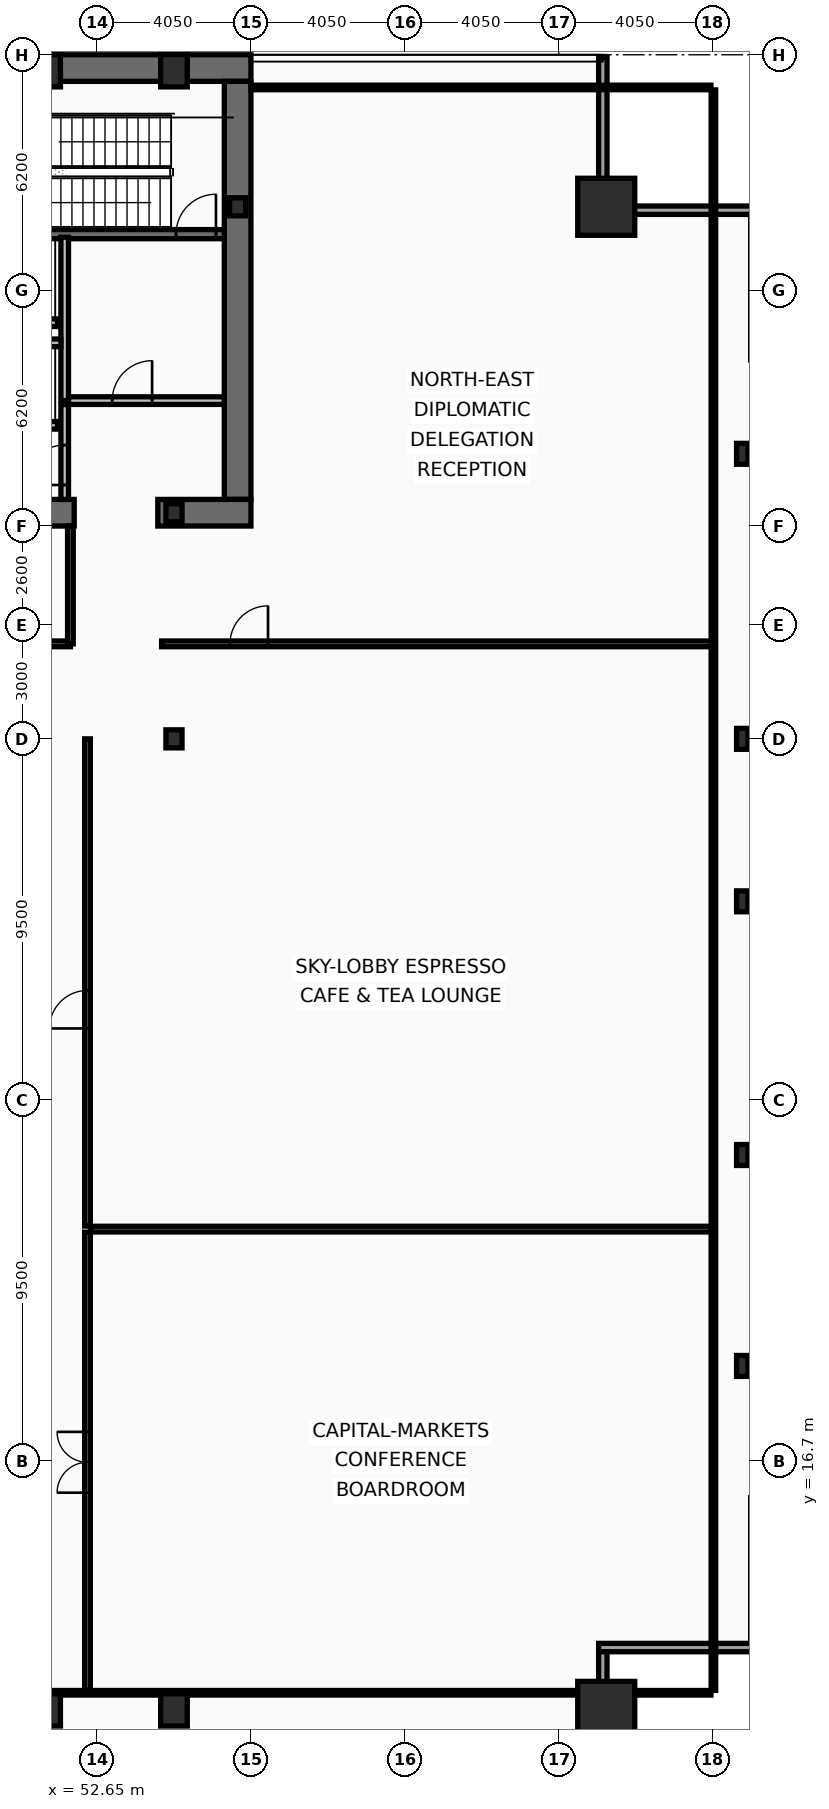
"""IFC4 building model, lengths in metres.
Left out: names, types, materials, properties, quantities, classifications, styles, units other than length and angle.
Written with IfcOpenShell. Run it as: python <this file> out.ifc"""

import sys

from ifc_helpers import new_model, si_unit, direction, frame, frame_2d, origin, origin_2d, place, context, subcontext, project, spatial, rectangle, hollow_rectangle, i_section, extrude, element, fill, save


model = new_model("IFC4")
c1 = context("Model", 3, precision=1e-05, world=origin(), true_north=direction((0.0, 1.0)))
c2 = subcontext(c1, "Body", "Model", "MODEL_VIEW")
j1 = project(units=[si_unit("LENGTHUNIT", "METRE"), si_unit("PLANEANGLEUNIT", "RADIAN")], contexts=[c1])
p1 = place(None, origin())
s1 = spatial("IfcSite", under=j1, at=p1, CompositionType="ELEMENT")
p2 = place(p1, origin())
s2 = spatial("IfcBuilding", under=s1, at=p2, CompositionType="ELEMENT")
p3 = place(p2, frame((0.0, 0.0, 106.6)))
s3 = spatial("IfcBuildingStorey", under=s2, at=p3, CompositionType="ELEMENT", Elevation=106.6)
p4 = place(p3, frame((16.2, 53.35, 0.0), z_axis=(0.0, 0.0, 1.0), x_axis=(1.0, 0.0, 0.0)))
e1 = element("IfcWall", 1, at=p4, inside=s3, PredefinedType="SHEAR", context=c2, shape_type="SweptSolid", body=[
    extrude(rectangle(XDim=40.5, YDim=0.7, at=frame_2d((20.25, 0.0))), origin(), (0.0, 0.0, 1.0), 4.24),
])
p5 = place(p3, frame((56.35, 53.0, 0.0), z_axis=(0.0, 0.0, 1.0), x_axis=(0.0, -1.0, 0.0)))
e2 = element("IfcWall", 2, at=p5, inside=s3, PredefinedType="SHEAR", context=c2, shape_type="SweptSolid", body=[
    extrude(rectangle(XDim=11.0, YDim=0.7, at=frame_2d((5.5, 0.0))), origin(), (0.0, 0.0, 1.0), 4.24),
])
p6 = place(p3, frame((52.05, 41.65, 0.0), z_axis=(0.0, 0.0, 1.0), x_axis=(-1.0, 0.0, 0.0)))
e3 = element("IfcWall", 3, at=p6, inside=s3, PredefinedType="SHEAR", context=c2, shape_type="SweptSolid", body=[
    extrude(rectangle(XDim=11.3, YDim=0.7, at=frame_2d((5.65, 0.0))), origin(), (0.0, 0.0, 1.0), 4.24),
])
p7 = place(p3, frame((56.7, 41.65, 0.0), z_axis=(0.0, 0.0, 1.0), x_axis=(-1.0, 0.0, 0.0)))
e4 = element("IfcWall", 4, at=p7, inside=s3, PredefinedType="SHEAR", context=c2, shape_type="SweptSolid", body=[
    extrude(rectangle(XDim=2.45, YDim=0.7, at=frame_2d((1.225, 0.0))), origin(), (0.0, 0.0, 1.0), 4.24),
])
p8 = place(p3, frame((48.63, 48.98, 0.0), z_axis=(0.0, 0.0, 1.0), x_axis=(1.0, 0.0, 0.0)))
e5 = element("IfcWall", 5, at=p8, inside=s3, PredefinedType="SHEAR", context=c2, shape_type="SweptSolid", body=[
    extrude(rectangle(XDim=7.37, YDim=0.24, at=frame_2d((3.685, 0.0))), origin(), (0.0, 0.0, 1.0), 4.24),
])
p9 = place(p8, frame((6.1, 0.0, 0.0)))
e6 = element("IfcOpeningElement", 6, at=p9, cuts=e5, PredefinedType="OPENING", context=c2, shape_type="SweptSolid", body=[
    extrude(rectangle(XDim=1.05, YDim=2.15, at=frame_2d((0.525, 1.075))), frame((0.0, 0.13, 0.0), z_axis=(0.0, -1.0, 0.0), x_axis=(1.0, 0.0, 0.0)), (0.0, 0.0, 1.0), 0.26),
])
for number, where, z_axis, x_axis in (
    (7, (66.05, 10.15, 0.0), (0.0, 0.0, 1.0), (1.0, 0.0, 0.0)),
    (8, (66.05, 49.7, 0.0), (0.0, 0.0, 1.0), (1.0, 0.0, 0.0)),
):
    element("IfcColumn", number, at=place(p3, frame(where, z_axis=z_axis, x_axis=x_axis)), inside=s3, PredefinedType="COLUMN", context=c2, shape_type="SweptSolid", body=[
        extrude(hollow_rectangle(XDim=1.5, YDim=1.5, WallThickness=0.07, at=origin_2d()), origin(), (0.0, 0.0, 1.0), 4.4),
    ])
for number, where, z_axis, x_axis in (
    (9, (51.337, 10.15, 0.0), (0.0, 0.0, 1.0), (1.0, 0.0, 0.0)),
    (10, (54.675, 10.15, 0.0), (0.0, 0.0, 1.0), (1.0, 0.0, 0.0)),
    (11, (51.337, 53.28, 0.0), (0.0, 0.0, 1.0), (1.0, 0.0, 0.0)),
    (12, (54.675, 53.28, 0.0), (0.0, 0.0, 1.0), (1.0, 0.0, 0.0)),
):
    element("IfcColumn", number, at=place(p3, frame(where, z_axis=z_axis, x_axis=x_axis)), inside=s3, PredefinedType="COLUMN", context=c2, shape_type="SweptSolid", body=[
        extrude(hollow_rectangle(XDim=0.7, YDim=0.85, WallThickness=0.05, at=origin_2d()), origin(), (0.0, 0.0, 1.0), 4.4),
    ])
for number, where, z_axis, x_axis in (
    (13, (69.63, 19.2, 0.0), (0.0, 0.0, 1.0), (1.0, 0.0, 0.0)),
    (14, (69.63, 24.75, 0.0), (0.0, 0.0, 1.0), (1.0, 0.0, 0.0)),
    (15, (69.63, 31.425, 0.0), (0.0, 0.0, 1.0), (1.0, 0.0, 0.0)),
    (16, (69.63, 35.7, 0.0), (0.0, 0.0, 1.0), (1.0, 0.0, 0.0)),
    (17, (69.63, 43.2, 0.0), (0.0, 0.0, 1.0), (1.0, 0.0, 0.0)),
):
    element("IfcColumn", number, at=place(p3, frame(where, z_axis=z_axis, x_axis=x_axis)), inside=s3, PredefinedType="COLUMN", context=c2, shape_type="SweptSolid", body=[
        extrude(i_section(OverallWidth=0.3, OverallDepth=0.55, WebThickness=0.015, FlangeThickness=0.029, at=origin_2d()), origin(), (0.0, 0.0, 1.0), 4.4),
    ])
for number, where, z_axis, x_axis in (
    (18, (56.35, 49.7, 0.0), (0.0, 0.0, 1.0), (1.0, 0.0, 0.0)),
    (19, (54.675, 35.7, 0.0), (0.0, 0.0, 1.0), (1.0, 0.0, 0.0)),
    (20, (54.675, 41.65, 0.0), (0.0, 0.0, 1.0), (1.0, 0.0, 0.0)),
):
    element("IfcColumn", number, at=place(p3, frame(where, z_axis=z_axis, x_axis=x_axis)), inside=s3, PredefinedType="COLUMN", context=c2, shape_type="SweptSolid", body=[
        extrude(i_section(OverallWidth=0.424, OverallDepth=0.474, WebThickness=0.048, FlangeThickness=0.077, at=origin_2d()), origin(), (0.0, 0.0, 1.0), 4.4),
    ])
p10 = place(p3, frame((65.96, 53.63, 0.0), z_axis=(0.0, 0.0, 1.0), x_axis=(0.0, -1.0, 0.0)))
e21 = element("IfcWall", 21, at=p10, inside=s3, PredefinedType="SOLIDWALL", context=c2, shape_type="SweptSolid", body=[
    extrude(rectangle(XDim=3.91, YDim=0.22, at=frame_2d((1.955, 0.0))), origin(), (0.0, 0.0, 1.0), 3.63),
])
for number, where, z_axis, x_axis in (
    (22, (65.85, 49.61, 0.0), (0.0, 0.0, 1.0), (1.0, 0.0, 0.0)),
    (23, (70.07, 11.79, 0.0), (0.0, 0.0, 1.0), (-1.0, 0.0, 0.0)),
):
    element("IfcWall", number, at=place(p3, frame(where, z_axis=z_axis, x_axis=x_axis)), inside=s3, PredefinedType="SOLIDWALL", context=c2, shape_type="SweptSolid", body=[
        extrude(rectangle(XDim=4.22, YDim=0.22, at=frame_2d((2.11, 0.0))), origin(), (0.0, 0.0, 1.0), 3.63),
    ])
p11 = place(p3, frame((65.96, 11.68, 0.0), z_axis=(0.0, 0.0, 1.0), x_axis=(0.0, -1.0, 0.0)))
e24 = element("IfcWall", 24, at=p11, inside=s3, PredefinedType="SOLIDWALL", context=c2, shape_type="SweptSolid", body=[
    extrude(rectangle(XDim=3.91, YDim=0.22, at=frame_2d((1.955, 0.0))), origin(), (0.0, 0.0, 1.0), 3.63),
])
p12 = place(p3, frame((51.61, 43.95, 0.0), z_axis=(0.0, 0.0, 1.0), x_axis=(-1.0, 0.0, 0.0)))
e25 = element("IfcWall", 25, at=p12, inside=s3, PredefinedType="PARTITIONING", context=c2, shape_type="SweptSolid", body=[
    extrude(rectangle(XDim=2.92, YDim=0.2, at=frame_2d((1.46, 0.0))), origin(), (0.0, 0.0, 1.0), 4.24),
])
p13 = place(p12, frame((0.81, 0.0, 0.0)))
e26 = element("IfcOpeningElement", 26, at=p13, cuts=e25, PredefinedType="OPENING", context=c2, shape_type="SweptSolid", body=[
    extrude(rectangle(XDim=1.3, YDim=2.18, at=frame_2d((0.65, 1.09))), frame((0.0, 0.11, 0.0), z_axis=(0.0, -1.0, 0.0), x_axis=(1.0, 0.0, 0.0)), (0.0, 0.0, 1.0), 0.22),
])
p14 = place(p3, frame((51.61, 46.65, 0.0), z_axis=(0.0, 0.0, 1.0), x_axis=(-1.0, 0.0, 0.0)))
e27 = element("IfcWall", 27, at=p14, inside=s3, PredefinedType="PARTITIONING", context=c2, shape_type="SweptSolid", body=[
    extrude(rectangle(XDim=2.92, YDim=0.2, at=frame_2d((1.46, 0.0))), origin(), (0.0, 0.0, 1.0), 4.24),
])
p15 = place(p14, frame((0.86, 0.0, 0.0)))
e28 = element("IfcOpeningElement", 28, at=p15, cuts=e27, PredefinedType="OPENING", context=c2, shape_type="SweptSolid", body=[
    extrude(rectangle(XDim=1.2, YDim=2.18, at=frame_2d((0.6, 1.09))), frame((0.0, 0.11, 0.0), z_axis=(0.0, -1.0, 0.0), x_axis=(1.0, 0.0, 0.0)), (0.0, 0.0, 1.0), 0.22),
])
p16 = place(p3, frame((51.8, 44.6, 0.0), z_axis=(0.0, 0.0, 1.0), x_axis=(0.0, 1.0, 0.0)))
e29 = element("IfcWall", 29, at=p16, inside=s3, PredefinedType="PARTITIONING", context=c2, shape_type="SweptSolid", body=[
    extrude(rectangle(XDim=4.3, YDim=0.2, at=frame_2d((2.15, 0.0))), origin(), (0.0, 0.0, 1.0), 4.24),
])
p17 = place(p3, frame((51.9, 44.6, 0.0), z_axis=(0.0, 0.0, 1.0), x_axis=(1.0, 0.0, 0.0)))
e30 = element("IfcWall", 30, at=p17, inside=s3, PredefinedType="PARTITIONING", context=c2, shape_type="SweptSolid", body=[
    extrude(rectangle(XDim=4.1, YDim=0.2, at=frame_2d((2.05, 0.0))), origin(), (0.0, 0.0, 1.0), 4.24),
])
p18 = place(p17, frame((1.15, 0.0, 0.0)))
e31 = element("IfcOpeningElement", 31, at=p18, cuts=e30, PredefinedType="OPENING", context=c2, shape_type="SweptSolid", body=[
    extrude(rectangle(XDim=1.05, YDim=2.15, at=frame_2d((0.525, 1.075))), frame((0.0, 0.11, 0.0), z_axis=(0.0, -1.0, 0.0), x_axis=(1.0, 0.0, 0.0)), (0.0, 0.0, 1.0), 0.22),
])
p19 = place(p3, frame((48.63, 46.12, 0.0), z_axis=(0.0, 0.0, 1.0), x_axis=(1.0, 0.0, 0.0)))
e32 = element("IfcWall", 32, at=p19, inside=s3, PredefinedType="PARTITIONING", context=c2, shape_type="SweptSolid", body=[
    extrude(rectangle(XDim=3.07, YDim=0.2, at=frame_2d((1.535, 0.0))), origin(), (0.0, 0.0, 1.0), 4.24),
])
p20 = place(p3, frame((51.8, 42.0, 0.0), z_axis=(0.0, 0.0, 1.0), x_axis=(0.0, 1.0, 0.0)))
e33 = element("IfcWall", 33, at=p20, inside=s3, PredefinedType="PARTITIONING", context=c2, shape_type="SweptSolid", body=[
    extrude(rectangle(XDim=2.495, YDim=0.2, at=frame_2d((1.248, 0.0))), origin(), (0.0, 0.0, 1.0), 4.24),
])
p21 = place(p20, frame((0.38, 0.0, 0.0)))
e34 = element("IfcOpeningElement", 34, at=p21, cuts=e33, PredefinedType="OPENING", context=c2, shape_type="SweptSolid", body=[
    extrude(rectangle(XDim=1.05, YDim=2.15, at=frame_2d((0.525, 1.075))), frame((0.0, 0.11, 0.0), z_axis=(0.0, -1.0, 0.0), x_axis=(1.0, 0.0, 0.0)), (0.0, 0.0, 1.0), 0.22),
])
p22 = place(p3, frame((52.4, 10.665, 0.0), z_axis=(0.0, 0.0, 1.0), x_axis=(0.0, 1.0, 0.0)))
e35 = element("IfcWall", 35, at=p22, inside=s3, PredefinedType="PARTITIONING", context=c2, shape_type="SweptSolid", body=[
    extrude(rectangle(XDim=12.055, YDim=0.15, at=frame_2d((6.027, 0.0))), origin(), (0.0, 0.0, 1.0), 3.68),
])
p23 = place(p22, frame((5.2, 0.0, 0.0)))
e36 = element("IfcOpeningElement", 36, at=p23, cuts=e35, PredefinedType="OPENING", context=c2, shape_type="SweptSolid", body=[
    extrude(rectangle(XDim=1.6, YDim=2.15, at=frame_2d((0.8, 1.075))), frame((0.0, 0.085, 0.0), z_axis=(0.0, -1.0, 0.0), x_axis=(1.0, 0.0, 0.0)), (0.0, 0.0, 1.0), 0.17),
])
p24 = place(p3, frame((52.4, 22.88, 0.0), z_axis=(0.0, 0.0, 1.0), x_axis=(0.0, 1.0, 0.0)))
e37 = element("IfcWall", 37, at=p24, inside=s3, PredefinedType="PARTITIONING", context=c2, shape_type="SweptSolid", body=[
    extrude(rectangle(XDim=12.82, YDim=0.15, at=frame_2d((6.41, 0.0))), origin(), (0.0, 0.0, 1.0), 3.68),
])
p25 = place(p24, frame((5.2, 0.0, 0.0)))
e38 = element("IfcOpeningElement", 38, at=p25, cuts=e37, PredefinedType="OPENING", context=c2, shape_type="SweptSolid", body=[
    extrude(rectangle(XDim=1.0, YDim=2.05, at=frame_2d((0.5, 1.025))), frame((0.0, 0.085, 0.0), z_axis=(0.0, -1.0, 0.0), x_axis=(1.0, 0.0, 0.0)), (0.0, 0.0, 1.0), 0.17),
])
p26 = place(p3, frame((52.48, 22.8, 0.0), z_axis=(0.0, 0.0, 1.0), x_axis=(1.0, 0.0, 0.0)))
e39 = element("IfcWall", 39, at=p26, inside=s3, PredefinedType="PARTITIONING", context=c2, shape_type="SweptSolid", body=[
    extrude(rectangle(XDim=16.325, YDim=0.15, at=frame_2d((8.163, 0.0))), origin(), (0.0, 0.0, 1.0), 3.53),
])
p27 = place(p3, frame((46.6, 38.2, 0.0), z_axis=(0.0, 0.0, 1.0), x_axis=(1.0, 0.0, 0.0)))
e40 = element("IfcWall", 40, at=p27, inside=s3, PredefinedType="PARTITIONING", context=c2, shape_type="SweptSolid", body=[
    extrude(rectangle(XDim=5.35, YDim=0.15, at=frame_2d((2.675, 0.0))), origin(), (0.0, 0.0, 1.0), 3.53),
])
p28 = place(p27, frame((2.0, 0.0, 0.0)))
e41 = element("IfcOpeningElement", 41, at=p28, cuts=e40, PredefinedType="OPENING", context=c2, shape_type="SweptSolid", body=[
    extrude(rectangle(XDim=0.9, YDim=2.05, at=frame_2d((0.45, 1.025))), frame((0.0, 0.085, 0.0), z_axis=(0.0, -1.0, 0.0), x_axis=(1.0, 0.0, 0.0)), (0.0, 0.0, 1.0), 0.17),
])
p29 = place(p3, frame((51.95, 38.2, 0.0), z_axis=(0.0, 0.0, 1.0), x_axis=(0.0, 1.0, 0.0)))
e42 = element("IfcWall", 42, at=p29, inside=s3, PredefinedType="PARTITIONING", context=c2, shape_type="SweptSolid", body=[
    extrude(rectangle(XDim=3.1, YDim=0.15, at=frame_2d((1.55, 0.0))), origin(), (0.0, 0.0, 1.0), 4.24),
])
p30 = place(p3, frame((54.35, 38.2, 0.0), z_axis=(0.0, 0.0, 1.0), x_axis=(1.0, 0.0, 0.0)))
e43 = element("IfcWall", 43, at=p30, inside=s3, PredefinedType="PARTITIONING", context=c2, shape_type="SweptSolid", body=[
    extrude(rectangle(XDim=14.52, YDim=0.15, at=frame_2d((7.26, 0.0))), origin(), (0.0, 0.0, 1.0), 3.53),
])
p31 = place(p30, frame((1.8, 0.0, 0.0)))
e44 = element("IfcOpeningElement", 44, at=p31, cuts=e43, PredefinedType="OPENING", context=c2, shape_type="SweptSolid", body=[
    extrude(rectangle(XDim=1.0, YDim=2.05, at=frame_2d((0.5, 1.025))), frame((0.0, 0.085, 0.0), z_axis=(0.0, -1.0, 0.0), x_axis=(1.0, 0.0, 0.0)), (0.0, 0.0, 1.0), 0.17),
])
p32 = place(p3, frame((68.87, 10.665, 0.0), z_axis=(0.0, 0.0, 1.0), x_axis=(0.0, 1.0, 0.0)))
e45 = element("IfcWall", 45, at=p32, inside=s3, PredefinedType="PARTITIONING", context=c2, shape_type="SweptSolid", body=[
    extrude(rectangle(XDim=42.11, YDim=0.12, at=frame_2d((21.055, 0.0))), origin(), (0.0, 0.0, 1.0), 3.53),
])
p33 = place(p3, frame((56.7, 52.84, 0.0), z_axis=(0.0, 0.0, 1.0), x_axis=(1.0, 0.0, 0.0)))
e46 = element("IfcWall", 46, at=p33, inside=s3, PredefinedType="PARTITIONING", context=c2, shape_type="SweptSolid", body=[
    extrude(rectangle(XDim=12.105, YDim=0.12, at=frame_2d((6.052, 0.0))), origin(), (0.0, 0.0, 1.0), 4.24),
])
p34 = place(p3, frame((4.095, 10.6, 0.0), z_axis=(0.0, 0.0, 1.0), x_axis=(1.0, 0.0, 0.0)))
e47 = element("IfcWall", 47, at=p34, inside=s3, PredefinedType="PARTITIONING", context=c2, shape_type="SweptSolid", body=[
    extrude(rectangle(XDim=64.71, YDim=0.12, at=frame_2d((32.355, 0.0))), origin(), (0.0, 0.0, 1.0), 3.53),
])
p35 = place(p9, origin())
e48 = element("IfcDoor", 48, at=p35, inside=s3, OperationType="SINGLE_SWING_RIGHT", PredefinedType="DOOR", context=c2, shape_type="SweptSolid", body=[
    extrude(rectangle(XDim=1.05, YDim=2.15, at=frame_2d((0.525, 1.075))), frame((0.0, 0.025, 0.0), z_axis=(0.0, -1.0, 0.0), x_axis=(1.0, 0.0, 0.0)), (0.0, 0.0, 1.0), 0.05),
])
fill(e6, e48)
p36 = place(p18, origin())
e49 = element("IfcDoor", 49, at=p36, inside=s3, OperationType="SINGLE_SWING_RIGHT", PredefinedType="DOOR", context=c2, shape_type="SweptSolid", body=[
    extrude(rectangle(XDim=1.05, YDim=2.15, at=frame_2d((0.525, 1.075))), frame((0.0, 0.025, 0.0), z_axis=(0.0, -1.0, 0.0), x_axis=(1.0, 0.0, 0.0)), (0.0, 0.0, 1.0), 0.05),
])
fill(e31, e49)
p37 = place(p21, origin())
e50 = element("IfcDoor", 50, at=p37, inside=s3, OperationType="SINGLE_SWING_LEFT", PredefinedType="DOOR", context=c2, shape_type="SweptSolid", body=[
    extrude(rectangle(XDim=1.05, YDim=2.15, at=frame_2d((0.525, 1.075))), frame((0.0, 0.025, 0.0), z_axis=(0.0, -1.0, 0.0), x_axis=(1.0, 0.0, 0.0)), (0.0, 0.0, 1.0), 0.05),
])
fill(e34, e50)
p38 = place(p23, origin())
e51 = element("IfcDoor", 51, at=p38, inside=s3, OperationType="DOUBLE_DOOR_SINGLE_SWING", PredefinedType="DOOR", context=c2, shape_type="SweptSolid", body=[
    extrude(rectangle(XDim=1.6, YDim=2.15, at=frame_2d((0.8, 1.075))), frame((0.0, 0.025, 0.0), z_axis=(0.0, -1.0, 0.0), x_axis=(1.0, 0.0, 0.0)), (0.0, 0.0, 1.0), 0.05),
])
fill(e36, e51)
p39 = place(p25, origin())
e52 = element("IfcDoor", 52, at=p39, inside=s3, OperationType="SINGLE_SWING_LEFT", PredefinedType="DOOR", context=c2, shape_type="SweptSolid", body=[
    extrude(rectangle(XDim=1.0, YDim=2.05, at=frame_2d((0.5, 1.025))), frame((0.0, 0.025, 0.0), z_axis=(0.0, -1.0, 0.0), x_axis=(1.0, 0.0, 0.0)), (0.0, 0.0, 1.0), 0.05),
])
fill(e38, e52)
p40 = place(p31, origin())
e53 = element("IfcDoor", 53, at=p40, inside=s3, OperationType="SINGLE_SWING_RIGHT", PredefinedType="DOOR", context=c2, shape_type="SweptSolid", body=[
    extrude(rectangle(XDim=1.0, YDim=2.05, at=frame_2d((0.5, 1.025))), frame((0.0, 0.025, 0.0), z_axis=(0.0, -1.0, 0.0), x_axis=(1.0, 0.0, 0.0)), (0.0, 0.0, 1.0), 0.05),
])
fill(e44, e53)
save(model, sys.argv[1])
